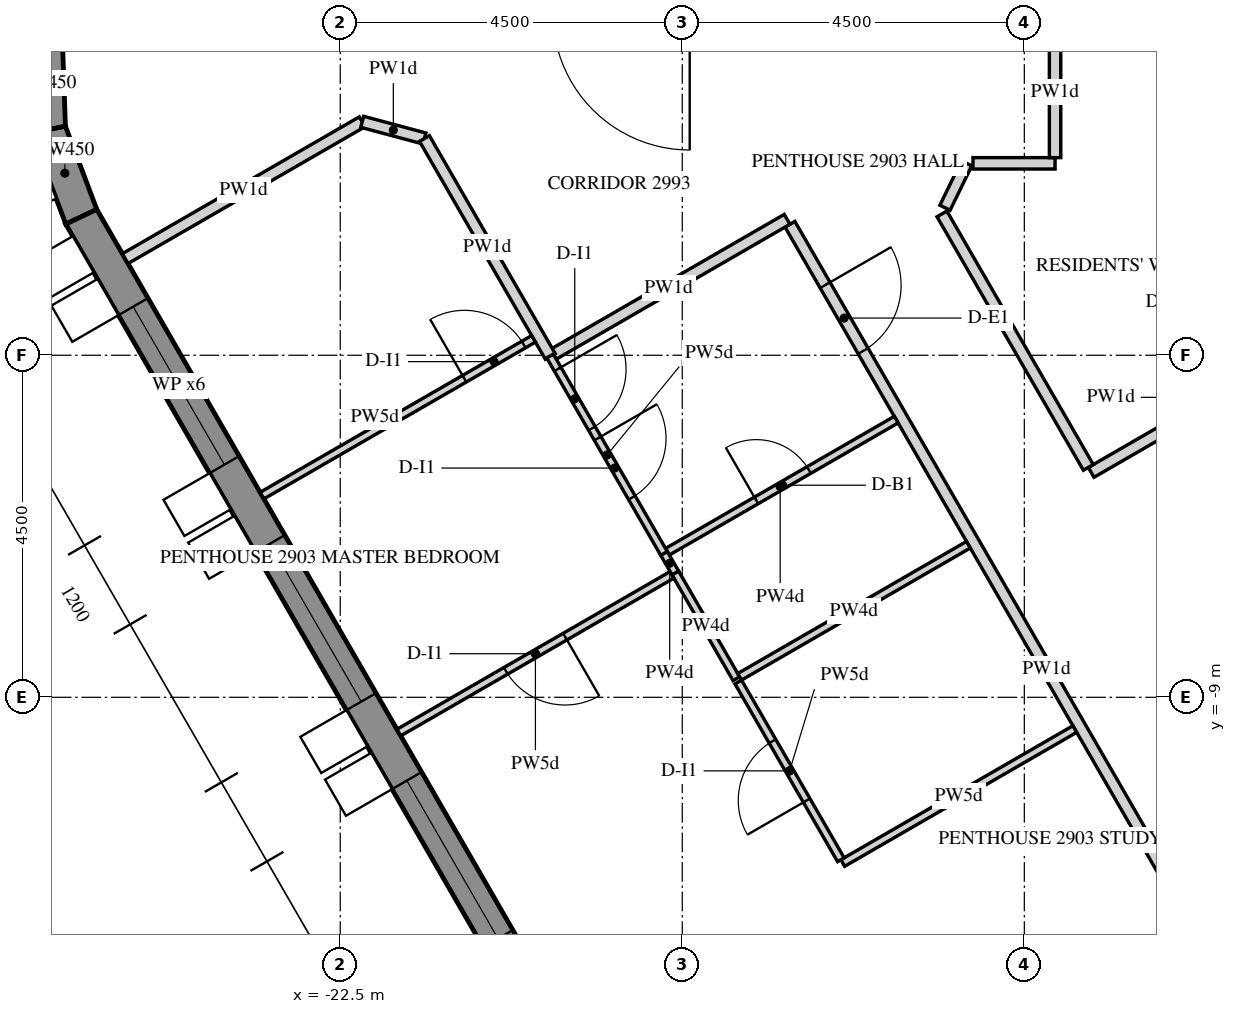
"""IFC4 building model, lengths in metres.
Left out: names, types, materials, properties, quantities, classifications, styles, units other than length and angle.
Written with IfcOpenShell. Run it as: python <this file> out.ifc"""

import sys

from ifc_helpers import new_model, si_unit, direction, frame, frame_2d, origin, place, context, subcontext, project, spatial, polyline, rectangle, outline, extrude, element, fill, save


model = new_model("IFC4")
c1 = context("Model", 3, precision=1e-05, world=origin(), true_north=direction((0.0, 1.0)))
c2 = subcontext(c1, "Body", "Model", "MODEL_VIEW")
j1 = project(units=[si_unit("LENGTHUNIT", "METRE"), si_unit("PLANEANGLEUNIT", "RADIAN")], contexts=[c1])
p1 = place(None, origin())
s1 = spatial("IfcSite", under=j1, at=p1, CompositionType="ELEMENT")
p2 = place(p1, origin())
s2 = spatial("IfcBuilding", under=s1, at=p2, CompositionType="ELEMENT")
p3 = place(p2, frame((0.0, 0.0, 369.0)))
s3 = spatial("IfcBuildingStorey", under=s2, at=p3, CompositionType="ELEMENT", Elevation=369.0)
p4 = place(p3, frame((-26.382, -0.309, -0.15), z_axis=(0.0, 0.0, 1.0), x_axis=(0.034887984255, -0.999391228976, 0.0)))
e1 = element("IfcWall", 1, at=p4, inside=s3, PredefinedType="SOLIDWALL", context=c2, shape_type="SweptSolid", body=[
    extrude(outline(polyline([(-0.037, -0.225), (1.261, -0.225), (1.188, 0.225), (0.037, 0.225), (-0.037, -0.225)])), origin(), (0.0, 0.0, 1.0), 3.9),
])
p5 = place(p3, frame((-26.339, -1.532, -0.15), z_axis=(0.0, 0.0, 1.0), x_axis=(0.353132996235, -0.935573132882, 0.0)))
e2 = element("IfcWall", 2, at=p5, inside=s3, PredefinedType="SOLIDWALL", context=c2, shape_type="SweptSolid", body=[
    extrude(outline(polyline([(-0.037, -0.225), (1.243, -0.225), (1.206, 0.225), (0.037, 0.225), (-0.037, -0.225)])), origin(), (0.0, 0.0, 1.0), 3.9),
])
p6 = place(p3, frame((-25.907, -2.678, -0.15), z_axis=(0.0, 0.0, 1.0), x_axis=(0.499997453958, -0.866026873738, 0.0)))
e3 = element("IfcWall", 3, at=p6, inside=s3, PredefinedType="SOLIDWALL", context=c2, shape_type="SweptSolid", body=[
    extrude(outline(polyline([(-0.018, -0.225), (23.152, -0.225), (23.11, 0.225), (0.018, 0.225), (-0.018, -0.225)])), origin(), (0.0, 0.0, 1.0), 3.9),
])
p7 = place(p6, frame((1.366, 0.0, 0.45)))
e4 = element("IfcOpeningElement", 4, at=p7, cuts=e3, PredefinedType="OPENING", context=c2, shape_type="SweptSolid", body=[
    extrude(rectangle(XDim=2.4, YDim=3.0, at=frame_2d((1.2, 1.5))), frame((0.0, 0.235, 0.0), z_axis=(0.0, -1.0, 0.0), x_axis=(1.0, 0.0, 0.0)), (0.0, 0.0, 1.0), 0.47),
])
p8 = place(p6, frame((4.966, 0.0, 0.45)))
e5 = element("IfcOpeningElement", 5, at=p8, cuts=e3, PredefinedType="OPENING", context=c2, shape_type="SweptSolid", body=[
    extrude(rectangle(XDim=2.4, YDim=3.0, at=frame_2d((1.2, 1.5))), frame((0.0, 0.235, 0.0), z_axis=(0.0, -1.0, 0.0), x_axis=(1.0, 0.0, 0.0)), (0.0, 0.0, 1.0), 0.47),
])
p9 = place(p6, frame((8.566, 0.0, 0.45)))
e6 = element("IfcOpeningElement", 6, at=p9, cuts=e3, PredefinedType="OPENING", context=c2, shape_type="SweptSolid", body=[
    extrude(rectangle(XDim=2.4, YDim=3.0, at=frame_2d((1.2, 1.5))), frame((0.0, 0.235, 0.0), z_axis=(0.0, -1.0, 0.0), x_axis=(1.0, 0.0, 0.0)), (0.0, 0.0, 1.0), 0.47),
])
p10 = place(p6, frame((12.166, 0.0, 0.45)))
e7 = element("IfcOpeningElement", 7, at=p10, cuts=e3, PredefinedType="OPENING", context=c2, shape_type="SweptSolid", body=[
    extrude(rectangle(XDim=2.4, YDim=3.0, at=frame_2d((1.2, 1.5))), frame((0.0, 0.235, 0.0), z_axis=(0.0, -1.0, 0.0), x_axis=(1.0, 0.0, 0.0)), (0.0, 0.0, 1.0), 0.47),
])
p11 = place(p6, frame((15.766, 0.0, 0.45)))
e8 = element("IfcOpeningElement", 8, at=p11, cuts=e3, PredefinedType="OPENING", context=c2, shape_type="SweptSolid", body=[
    extrude(rectangle(XDim=2.4, YDim=3.0, at=frame_2d((1.2, 1.5))), frame((0.0, 0.235, 0.0), z_axis=(0.0, -1.0, 0.0), x_axis=(1.0, 0.0, 0.0)), (0.0, 0.0, 1.0), 0.47),
])
p12 = place(p6, frame((19.366, 0.0, 0.45)))
e9 = element("IfcOpeningElement", 9, at=p12, cuts=e3, PredefinedType="OPENING", context=c2, shape_type="SweptSolid", body=[
    extrude(rectangle(XDim=2.4, YDim=3.0, at=frame_2d((1.2, 1.5))), frame((0.0, 0.235, 0.0), z_axis=(0.0, -1.0, 0.0), x_axis=(1.0, 0.0, 0.0)), (0.0, 0.0, 1.0), 0.47),
])
p13 = place(p3, frame((-16.583, -2.777, 0.0), z_axis=(0.0, 0.0, 1.0), x_axis=(0.50000467473, -0.866022704811, 0.0)))
e10 = element("IfcWall", 10, at=p13, inside=s3, PredefinedType="PARTITIONING", context=c2, shape_type="SweptSolid", body=[
    extrude(rectangle(XDim=13.504, YDim=0.15, at=frame_2d((6.752, 0.0))), origin(), (0.0, 0.0, 1.0), 2.47),
])
p14 = place(p13, frame((0.925, 0.0, 0.0)))
e11 = element("IfcOpeningElement", 11, at=p14, cuts=e10, PredefinedType="OPENING", context=c2, shape_type="SweptSolid", body=[
    extrude(rectangle(XDim=1.0, YDim=2.1, at=frame_2d((0.5, 1.05))), frame((0.0, 0.085, 0.0), z_axis=(0.0, -1.0, 0.0), x_axis=(1.0, 0.0, 0.0)), (0.0, 0.0, 1.0), 0.17),
])
p15 = place(p3, frame((-19.739, -4.512, 0.0), z_axis=(0.0, 0.0, 1.0), x_axis=(0.866018442252, 0.500012057535, 0.0)))
e12 = element("IfcWall", 12, at=p15, inside=s3, PredefinedType="PARTITIONING", context=c2, shape_type="SweptSolid", body=[
    extrude(rectangle(XDim=3.6, YDim=0.15, at=frame_2d((1.8, 0.0))), origin(), (0.0, 0.0, 1.0), 2.47),
])
p16 = place(p3, frame((-25.329, -3.229, 0.0), z_axis=(0.0, 0.0, 1.0), x_axis=(0.866030854095, 0.499990559667, 0.0)))
e13 = element("IfcWall", 13, at=p16, inside=s3, PredefinedType="PARTITIONING", context=c2, shape_type="SweptSolid", body=[
    extrude(rectangle(XDim=3.6, YDim=0.15, at=frame_2d((1.8, 0.0))), origin(), (0.0, 0.0, 1.0), 2.47),
])
p17 = place(p3, frame((-22.211, -1.429, 0.0), z_axis=(0.0, 0.0, 1.0), x_axis=(0.965937762102, -0.258774495933, 0.0)))
e14 = element("IfcWall", 14, at=p17, inside=s3, PredefinedType="PARTITIONING", context=c2, shape_type="SweptSolid", body=[
    extrude(rectangle(XDim=0.847, YDim=0.15, at=frame_2d((0.424, 0.0))), origin(), (0.0, 0.0, 1.0), 2.47),
])
p18 = place(p3, frame((-21.392, -1.648, 0.0), z_axis=(0.0, 0.0, 1.0), x_axis=(0.500018282537, -0.866014848099, 0.0)))
e15 = element("IfcWall", 15, at=p18, inside=s3, PredefinedType="PARTITIONING", context=c2, shape_type="SweptSolid", body=[
    extrude(rectangle(XDim=3.31, YDim=0.15, at=frame_2d((1.655, 0.0))), origin(), (0.0, 0.0, 1.0), 2.47),
])
p19 = place(p3, frame((-9.2, -4.066, 0.0), z_axis=(0.0, 0.0, 1.0), x_axis=(-0.866020906874, -0.500007788796, 0.0)))
e16 = element("IfcWall", 16, at=p19, inside=s3, PredefinedType="PARTITIONING", context=c2, shape_type="SweptSolid", body=[
    extrude(rectangle(XDim=3.95, YDim=0.15, at=frame_2d((1.975, 0.0))), origin(), (0.0, 0.0, 1.0), 2.47),
])
p20 = place(p19, frame((1.525, 0.0, 0.0)))
e17 = element("IfcOpeningElement", 17, at=p20, cuts=e16, PredefinedType="OPENING", context=c2, shape_type="SweptSolid", body=[
    extrude(rectangle(XDim=0.9, YDim=2.1, at=frame_2d((0.45, 1.05))), frame((0.0, 0.085, 0.0), z_axis=(0.0, -1.0, 0.0), x_axis=(1.0, 0.0, 0.0)), (0.0, 0.0, 1.0), 0.17),
])
p21 = place(p3, frame((-12.658, -5.976, 0.0), z_axis=(0.0, 0.0, 1.0), x_axis=(-0.499991345342, 0.866030400496, 0.0)))
e18 = element("IfcWall", 18, at=p21, inside=s3, PredefinedType="PARTITIONING", context=c2, shape_type="SweptSolid", body=[
    extrude(rectangle(XDim=3.851, YDim=0.15, at=frame_2d((1.926, 0.0))), origin(), (0.0, 0.0, 1.0), 2.47),
])
p22 = place(p3, frame((-14.544, -2.559, 0.0), z_axis=(0.0, 0.0, 1.0), x_axis=(0.438630789999, 0.898667363414, 0.0)))
e19 = element("IfcWall", 19, at=p22, inside=s3, PredefinedType="PARTITIONING", context=c2, shape_type="SweptSolid", body=[
    extrude(rectangle(XDim=0.65, YDim=0.15, at=frame_2d((0.325, 0.0))), origin(), (0.0, 0.0, 1.0), 2.47),
])
p23 = place(p3, frame((-14.176, -1.975, 0.0), z_axis=(0.0, 0.0, 1.0), x_axis=(1.0, 0.0, 0.0)))
e20 = element("IfcWall", 20, at=p23, inside=s3, PredefinedType="PARTITIONING", context=c2, shape_type="SweptSolid", body=[
    extrude(rectangle(XDim=1.08, YDim=0.15, at=frame_2d((0.54, 0.0))), origin(), (0.0, 0.0, 1.0), 2.47),
])
p24 = place(p3, frame((-13.096, -1.9, 0.0), z_axis=(0.0, 0.0, 1.0), x_axis=(0.0, 1.0, 0.0)))
e21 = element("IfcWall", 21, at=p24, inside=s3, PredefinedType="PARTITIONING", context=c2, shape_type="SweptSolid", body=[
    extrude(rectangle(XDim=1.725, YDim=0.15, at=frame_2d((0.862, 0.0))), origin(), (0.0, 0.0, 1.0), 2.47),
])
p25 = place(p3, frame((-17.289, -8.755, 0.0), z_axis=(0.0, 0.0, 1.0), x_axis=(-0.499958946799, 0.866049104564, 0.0)))
e22 = element("IfcWall", 22, at=p25, inside=s3, PredefinedType="PARTITIONING", context=c2, shape_type="SweptSolid", body=[
    extrude(rectangle(XDim=1.609, YDim=0.1, at=frame_2d((0.804, 0.0))), origin(), (0.0, 0.0, 1.0), 2.47),
])
p26 = place(p3, frame((-18.135, -7.389, 0.0), z_axis=(0.0, 0.0, 1.0), x_axis=(-0.86602981871, -0.499992353047, 0.0)))
e23 = element("IfcWall", 23, at=p26, inside=s3, PredefinedType="PARTITIONING", context=c2, shape_type="SweptSolid", body=[
    extrude(rectangle(XDim=4.15, YDim=0.1, at=frame_2d((2.075, 0.0))), origin(), (0.0, 0.0, 1.0), 2.47),
])
p27 = place(p26, frame((1.625, 0.0, 0.0)))
e24 = element("IfcOpeningElement", 24, at=p27, cuts=e23, PredefinedType="OPENING", context=c2, shape_type="SweptSolid", body=[
    extrude(rectangle(XDim=0.9, YDim=2.1, at=frame_2d((0.45, 1.05))), frame((0.0, 0.06, 0.0), z_axis=(0.0, -1.0, 0.0), x_axis=(1.0, 0.0, 0.0)), (0.0, 0.0, 1.0), 0.12),
])
p28 = place(p3, frame((-12.836, -9.418, 0.0), z_axis=(0.0, 0.0, 1.0), x_axis=(-0.866031034943, -0.499990246421, 0.0)))
e25 = element("IfcWall", 25, at=p28, inside=s3, PredefinedType="PARTITIONING", context=c2, shape_type="SweptSolid", body=[
    extrude(rectangle(XDim=3.525, YDim=0.1, at=frame_2d((1.762, 0.0))), origin(), (0.0, 0.0, 1.0), 2.47),
])
p29 = place(p3, frame((-15.914, -11.137, 0.0), z_axis=(0.0, 0.0, 1.0), x_axis=(-0.50000943426, 0.866019956843, 0.0)))
e26 = element("IfcWall", 26, at=p29, inside=s3, PredefinedType="PARTITIONING", context=c2, shape_type="SweptSolid", body=[
    extrude(rectangle(XDim=2.7, YDim=0.1, at=frame_2d((1.35, 0.0))), origin(), (0.0, 0.0, 1.0), 2.47),
])
p30 = place(p29, frame((0.9, 0.0, 0.0)))
e27 = element("IfcOpeningElement", 27, at=p30, cuts=e26, PredefinedType="OPENING", context=c2, shape_type="SweptSolid", body=[
    extrude(rectangle(XDim=0.9, YDim=2.1, at=frame_2d((0.45, 1.05))), frame((0.0, 0.06, 0.0), z_axis=(0.0, -1.0, 0.0), x_axis=(1.0, 0.0, 0.0)), (0.0, 0.0, 1.0), 0.12),
])
p31 = place(p3, frame((-18.239, -7.11, 0.0), z_axis=(0.0, 0.0, 1.0), x_axis=(0.866031034943, 0.499990246421, 0.0)))
e28 = element("IfcWall", 28, at=p31, inside=s3, PredefinedType="PARTITIONING", context=c2, shape_type="SweptSolid", body=[
    extrude(rectangle(XDim=3.525, YDim=0.1, at=frame_2d((1.762, 0.0))), origin(), (0.0, 0.0, 1.0), 2.47),
])
p32 = place(p31, frame((1.4, 0.0, 0.0)))
e29 = element("IfcOpeningElement", 29, at=p32, cuts=e28, PredefinedType="OPENING", context=c2, shape_type="SweptSolid", body=[
    extrude(rectangle(XDim=0.8, YDim=2.1, at=frame_2d((0.4, 1.05))), frame((0.0, 0.06, 0.0), z_axis=(0.0, -1.0, 0.0), x_axis=(1.0, 0.0, 0.0)), (0.0, 0.0, 1.0), 0.12),
])
p33 = place(p3, frame((-19.74, -4.51, 0.0), z_axis=(0.0, 0.0, 1.0), x_axis=(0.499985098601, -0.86603400694, 0.0)))
e30 = element("IfcWall", 30, at=p33, inside=s3, PredefinedType="PARTITIONING", context=c2, shape_type="SweptSolid", body=[
    extrude(rectangle(XDim=3.004, YDim=0.1, at=frame_2d((1.502, 0.0))), origin(), (0.0, 0.0, 1.0), 2.47),
])
p34 = place(p33, frame((0.2, 0.0, 0.0)))
e31 = element("IfcOpeningElement", 31, at=p34, cuts=e30, PredefinedType="OPENING", context=c2, shape_type="SweptSolid", body=[
    extrude(rectangle(XDim=0.9, YDim=2.1, at=frame_2d((0.45, 1.05))), frame((0.0, 0.06, 0.0), z_axis=(0.0, -1.0, 0.0), x_axis=(1.0, 0.0, 0.0)), (0.0, 0.0, 1.0), 0.12),
])
p35 = place(p33, frame((1.252, 0.0, 0.0)))
e32 = element("IfcOpeningElement", 32, at=p35, cuts=e30, PredefinedType="OPENING", context=c2, shape_type="SweptSolid", body=[
    extrude(rectangle(XDim=0.9, YDim=2.1, at=frame_2d((0.45, 1.05))), frame((0.0, 0.06, 0.0), z_axis=(0.0, -1.0, 0.0), x_axis=(1.0, 0.0, 0.0)), (0.0, 0.0, 1.0), 0.12),
])
p36 = place(p3, frame((-18.24, -7.108, 0.0), z_axis=(0.0, 0.0, 1.0), x_axis=(0.499960902066, -0.86604797581, 0.0)))
e33 = element("IfcWall", 33, at=p36, inside=s3, PredefinedType="PARTITIONING", context=c2, shape_type="SweptSolid", body=[
    extrude(rectangle(XDim=0.295, YDim=0.1, at=frame_2d((0.148, 0.0))), origin(), (0.0, 0.0, 1.0), 2.47),
])
p37 = place(p3, frame((-17.245, -8.73, 0.0), z_axis=(0.0, 0.0, 1.0), x_axis=(0.866055725969, 0.499947476758, 0.0)))
e34 = element("IfcWall", 34, at=p37, inside=s3, PredefinedType="PARTITIONING", context=c2, shape_type="SweptSolid", body=[
    extrude(rectangle(XDim=3.475, YDim=0.1, at=frame_2d((1.737, 0.0))), origin(), (0.0, 0.0, 1.0), 2.47),
])
p38 = place(p3, frame((-23.529, -6.346, 0.0), z_axis=(0.0, 0.0, 1.0), x_axis=(0.866019999656, 0.500009360108, 0.0)))
e35 = element("IfcWall", 35, at=p38, inside=s3, PredefinedType="PARTITIONING", context=c2, shape_type="SweptSolid", body=[
    extrude(rectangle(XDim=4.125, YDim=0.1, at=frame_2d((2.062, 0.0))), origin(), (0.0, 0.0, 1.0), 2.47),
])
p39 = place(p38, frame((3.075, 0.0, 0.0)))
e36 = element("IfcOpeningElement", 36, at=p39, cuts=e35, PredefinedType="OPENING", context=c2, shape_type="SweptSolid", body=[
    extrude(rectangle(XDim=0.9, YDim=2.1, at=frame_2d((0.45, 1.05))), frame((0.0, 0.06, 0.0), z_axis=(0.0, -1.0, 0.0), x_axis=(1.0, 0.0, 0.0)), (0.0, 0.0, 1.0), 0.12),
])
p40 = place(p7, frame((0.0, 0.155, 0.0)))
e37 = element("IfcWindow", 37, at=p40, inside=s3, PartitioningType="DOUBLE_PANEL_VERTICAL", PredefinedType="WINDOW", context=c2, shape_type="SweptSolid", body=[
    extrude(rectangle(XDim=2.4, YDim=3.0, at=frame_2d((1.2, 1.5))), frame((0.0, 0.03, 0.0), z_axis=(0.0, -1.0, 0.0), x_axis=(1.0, 0.0, 0.0)), (0.0, 0.0, 1.0), 0.06),
])
fill(e4, e37)
p41 = place(p8, frame((0.0, 0.155, 0.0)))
e38 = element("IfcWindow", 38, at=p41, inside=s3, PartitioningType="DOUBLE_PANEL_VERTICAL", PredefinedType="WINDOW", context=c2, shape_type="SweptSolid", body=[
    extrude(rectangle(XDim=2.4, YDim=3.0, at=frame_2d((1.2, 1.5))), frame((0.0, 0.03, 0.0), z_axis=(0.0, -1.0, 0.0), x_axis=(1.0, 0.0, 0.0)), (0.0, 0.0, 1.0), 0.06),
])
fill(e5, e38)
p42 = place(p9, frame((0.0, 0.155, 0.0)))
e39 = element("IfcWindow", 39, at=p42, inside=s3, PartitioningType="DOUBLE_PANEL_VERTICAL", PredefinedType="WINDOW", context=c2, shape_type="SweptSolid", body=[
    extrude(rectangle(XDim=2.4, YDim=3.0, at=frame_2d((1.2, 1.5))), frame((0.0, 0.03, 0.0), z_axis=(0.0, -1.0, 0.0), x_axis=(1.0, 0.0, 0.0)), (0.0, 0.0, 1.0), 0.06),
])
fill(e6, e39)
p43 = place(p14, origin())
e40 = element("IfcDoor", 40, at=p43, inside=s3, OperationType="SINGLE_SWING_RIGHT", PredefinedType="DOOR", context=c2, shape_type="SweptSolid", body=[
    extrude(rectangle(XDim=1.0, YDim=2.1, at=frame_2d((0.5, 1.05))), frame((0.0, 0.025, 0.0), z_axis=(0.0, -1.0, 0.0), x_axis=(1.0, 0.0, 0.0)), (0.0, 0.0, 1.0), 0.05),
])
fill(e11, e40)
p44 = place(p32, origin())
e41 = element("IfcDoor", 41, at=p44, inside=s3, OperationType="SINGLE_SWING_LEFT", PredefinedType="DOOR", context=c2, shape_type="SweptSolid", body=[
    extrude(rectangle(XDim=0.8, YDim=2.1, at=frame_2d((0.4, 1.05))), frame((0.0, 0.025, 0.0), z_axis=(0.0, -1.0, 0.0), x_axis=(1.0, 0.0, 0.0)), (0.0, 0.0, 1.0), 0.05),
])
fill(e29, e41)
p45 = place(p34, origin())
e42 = element("IfcDoor", 42, at=p45, inside=s3, OperationType="SINGLE_SWING_LEFT", PredefinedType="DOOR", context=c2, shape_type="SweptSolid", body=[
    extrude(rectangle(XDim=0.9, YDim=2.1, at=frame_2d((0.45, 1.05))), frame((0.0, 0.025, 0.0), z_axis=(0.0, -1.0, 0.0), x_axis=(1.0, 0.0, 0.0)), (0.0, 0.0, 1.0), 0.05),
])
fill(e31, e42)
p46 = place(p39, origin())
e43 = element("IfcDoor", 43, at=p46, inside=s3, OperationType="SINGLE_SWING_RIGHT", PredefinedType="DOOR", context=c2, shape_type="SweptSolid", body=[
    extrude(rectangle(XDim=0.9, YDim=2.1, at=frame_2d((0.45, 1.05))), frame((0.0, 0.025, 0.0), z_axis=(0.0, -1.0, 0.0), x_axis=(1.0, 0.0, 0.0)), (0.0, 0.0, 1.0), 0.05),
])
fill(e36, e43)
p47 = place(p35, origin())
e44 = element("IfcDoor", 44, at=p47, inside=s3, OperationType="SINGLE_SWING_LEFT", PredefinedType="DOOR", context=c2, shape_type="SweptSolid", body=[
    extrude(rectangle(XDim=0.9, YDim=2.1, at=frame_2d((0.45, 1.05))), frame((0.0, 0.025, 0.0), z_axis=(0.0, -1.0, 0.0), x_axis=(1.0, 0.0, 0.0)), (0.0, 0.0, 1.0), 0.05),
])
fill(e32, e44)
p48 = place(p30, origin())
e45 = element("IfcDoor", 45, at=p48, inside=s3, OperationType="SINGLE_SWING_LEFT", PredefinedType="DOOR", context=c2, shape_type="SweptSolid", body=[
    extrude(rectangle(XDim=0.9, YDim=2.1, at=frame_2d((0.45, 1.05))), frame((0.0, 0.025, 0.0), z_axis=(0.0, -1.0, 0.0), x_axis=(1.0, 0.0, 0.0)), (0.0, 0.0, 1.0), 0.05),
])
fill(e27, e45)
p49 = place(p27, origin())
e46 = element("IfcDoor", 46, at=p49, inside=s3, OperationType="SINGLE_SWING_RIGHT", PredefinedType="DOOR", context=c2, shape_type="SweptSolid", body=[
    extrude(rectangle(XDim=0.9, YDim=2.1, at=frame_2d((0.45, 1.05))), frame((0.0, 0.025, 0.0), z_axis=(0.0, -1.0, 0.0), x_axis=(1.0, 0.0, 0.0)), (0.0, 0.0, 1.0), 0.05),
])
fill(e24, e46)
save(model, sys.argv[1])
